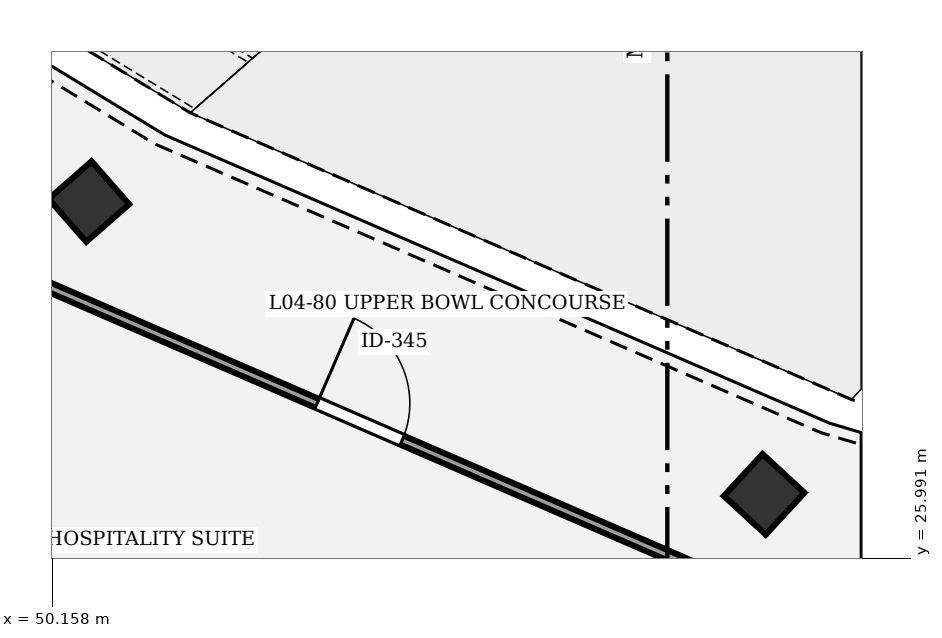
"""IFC4 building model, lengths in metres.
Left out: names, types, materials, properties, quantities, classifications, styles, units other than length and angle.
Written with IfcOpenShell. Run it as: python <this file> out.ifc"""

import sys

from ifc_helpers import new_model, si_unit, direction, frame, frame_2d, origin, origin_2d, place, context, subcontext, project, spatial, rectangle, extrude, element, fill, save


model = new_model("IFC4")
c1 = context("Model", 3, precision=1e-05, world=origin(), true_north=direction((0.0, 1.0)))
c2 = subcontext(c1, "Body", "Model", "MODEL_VIEW")
j1 = project(units=[si_unit("LENGTHUNIT", "METRE"), si_unit("PLANEANGLEUNIT", "RADIAN")], contexts=[c1])
p1 = place(None, origin())
s1 = spatial("IfcSite", under=j1, at=p1, CompositionType="ELEMENT")
p2 = place(p1, origin())
s2 = spatial("IfcBuilding", under=s1, at=p2, CompositionType="ELEMENT")
p3 = place(p2, frame((0.0, 0.0, 19.2)))
s3 = spatial("IfcBuildingStorey", under=s2, at=p3, CompositionType="ELEMENT", Elevation=19.2)
for number, where, z_axis, x_axis in (
    (1, (50.64, 30.683, 0.0), (0.0, 0.0, 1.0), (-0.753, -0.659, 0.0)),
    (2, (59.524, 26.832, 0.0), (0.0, 0.0, 1.0), (-0.678, -0.735, 0.0)),
):
    element("IfcColumn", number, at=place(p3, frame(where, z_axis=z_axis, x_axis=x_axis)), inside=s3, PredefinedType="COLUMN", context=c2, shape_type="SweptSolid", body=[
        extrude(rectangle(XDim=0.75, YDim=0.75, at=origin_2d()), origin(), (0.0, 0.0, 1.0), 4.8),
    ])
p4 = place(p3, frame((49.81, 29.69, 0.0), z_axis=(0.0, 0.0, 1.0), x_axis=(0.917512204383, -0.397707624779, 0.0)))
e3 = element("IfcWall", 3, at=p4, inside=s3, PredefinedType="PARTITIONING", context=c2, shape_type="SweptSolid", body=[
    extrude(rectangle(XDim=9.574, YDim=0.125, at=frame_2d((4.787, 0.0))), origin(), (0.0, 0.0, 1.0), 3.55),
])
p5 = place(p4, frame((4.177, 0.0, 0.0)))
e4 = element("IfcOpeningElement", 4, at=p5, cuts=e3, PredefinedType="OPENING", context=c2, shape_type="SweptSolid", body=[
    extrude(rectangle(XDim=1.22, YDim=2.2, at=frame_2d((0.61, 1.1))), frame((0.0, 0.073, 0.0), z_axis=(0.0, -1.0, 0.0), x_axis=(1.0, 0.0, 0.0)), (0.0, 0.0, 1.0), 0.145),
])
p6 = place(p5, origin())
e5 = element("IfcDoor", 5, at=p6, inside=s3, OperationType="SINGLE_SWING_LEFT", PredefinedType="DOOR", context=c2, shape_type="SweptSolid", body=[
    extrude(rectangle(XDim=1.22, YDim=2.2, at=frame_2d((0.61, 1.1))), frame((0.0, 0.025, 0.0), z_axis=(0.0, -1.0, 0.0), x_axis=(1.0, 0.0, 0.0)), (0.0, 0.0, 1.0), 0.05),
])
fill(e4, e5)
save(model, sys.argv[1])
